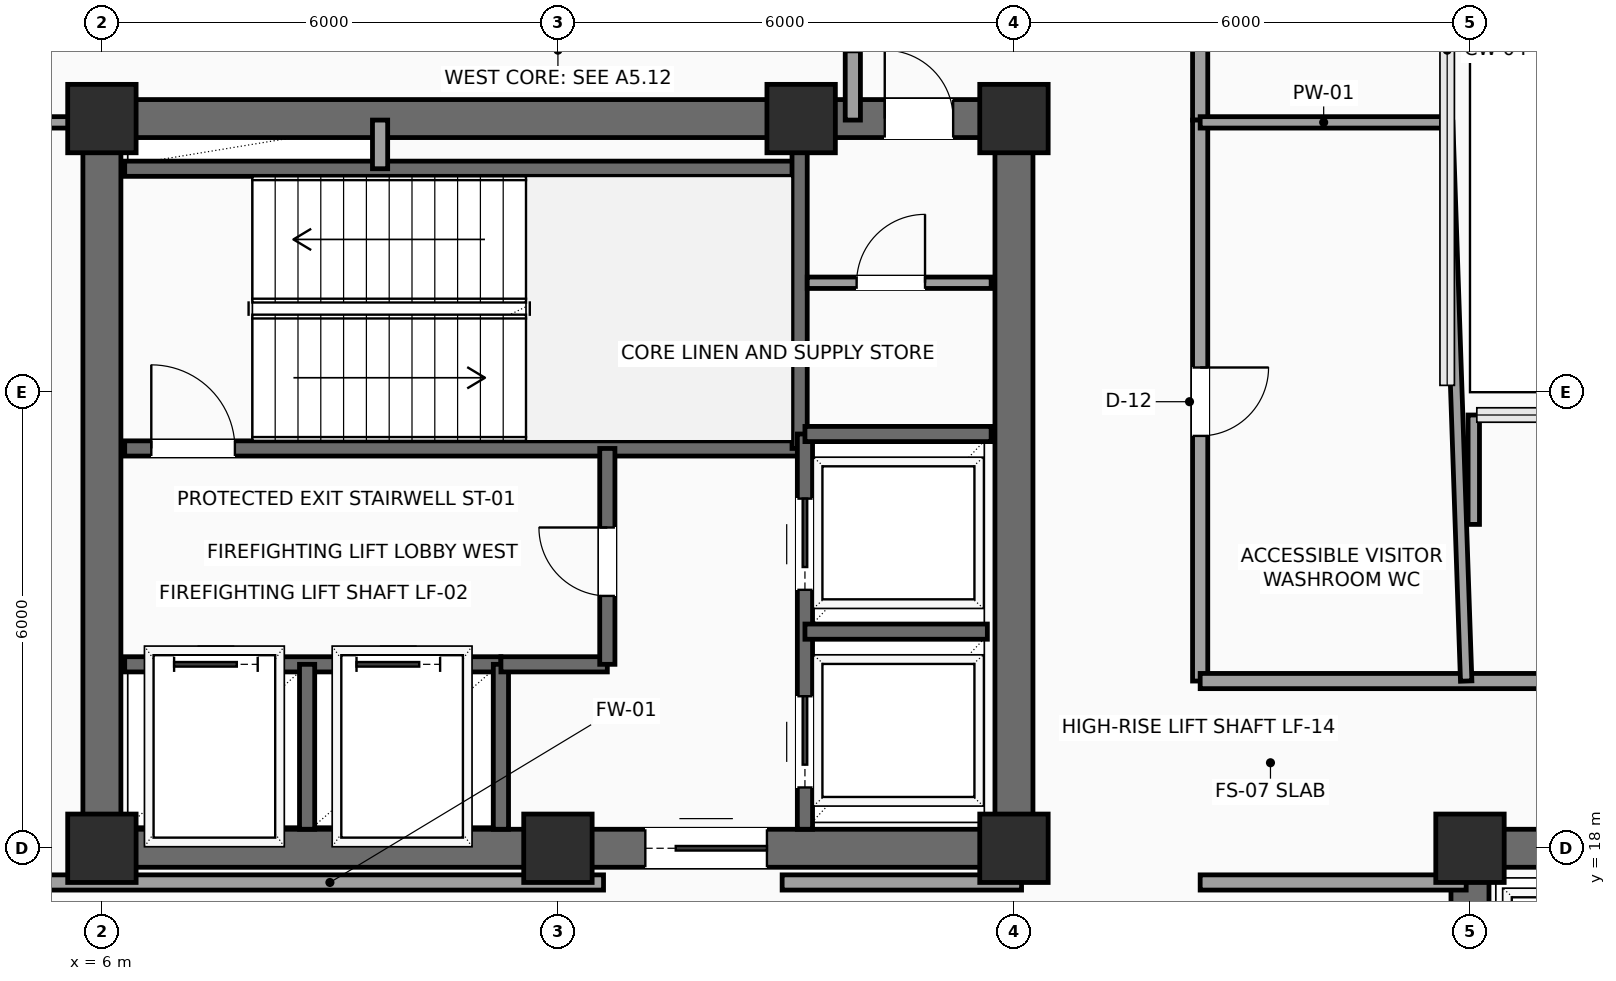
"""IFC4 building model, lengths in metres.
Left out: names, types, materials, properties, quantities, classifications, styles, units other than length and angle.
Written with IfcOpenShell. Run it as: python <this file> out.ifc"""

import sys

from ifc_helpers import new_model, si_unit, direction, frame, frame_2d, origin, origin_2d, place, context, subcontext, project, spatial, rectangle, extrude, element, fill, save


model = new_model("IFC4")
c1 = context("Model", 3, precision=1e-05, world=origin(), true_north=direction((0.0, 1.0)))
c2 = subcontext(c1, "Body", "Model", "MODEL_VIEW")
j1 = project(units=[si_unit("LENGTHUNIT", "METRE"), si_unit("PLANEANGLEUNIT", "RADIAN")], contexts=[c1])
p1 = place(None, origin())
s1 = spatial("IfcSite", under=j1, at=p1, CompositionType="ELEMENT")
p2 = place(p1, origin())
s2 = spatial("IfcBuilding", under=s1, at=p2, CompositionType="ELEMENT")
p3 = place(p2, frame((0.0, 0.0, 219.9)))
s3 = spatial("IfcBuildingStorey", under=s2, at=p3, CompositionType="ELEMENT", Elevation=219.9)
for number, where, z_axis, x_axis in (
    (1, (6.0, 18.0, 0.0), (0.0, 0.0, 1.0), (1.0, 0.0, 0.0)),
    (2, (12.0, 18.0, 0.0), (0.0, 0.0, 1.0), (1.0, 0.0, 0.0)),
    (3, (18.0, 18.0, 0.0), (0.0, 0.0, 1.0), (1.0, 0.0, 0.0)),
    (4, (6.0, 27.6, 0.0), (0.0, 0.0, 1.0), (1.0, 0.0, 0.0)),
    (5, (15.2, 27.6, 0.0), (0.0, 0.0, 1.0), (1.0, 0.0, 0.0)),
    (6, (18.0, 27.6, 0.0), (0.0, 0.0, 1.0), (1.0, 0.0, 0.0)),
    (7, (24.0, 18.0, 0.0), (0.0, 0.0, 1.0), (1.0, 0.0, 0.0)),
):
    element("IfcColumn", number, at=place(p3, frame(where, z_axis=z_axis, x_axis=x_axis)), inside=s3, PredefinedType="COLUMN", context=c2, shape_type="SweptSolid", body=[
        extrude(rectangle(XDim=0.9, YDim=0.9, at=origin_2d()), origin(), (0.0, 0.0, 1.0), 3.75),
    ])
p4 = place(p3, frame((6.0, 18.0, 0.0), z_axis=(0.0, 0.0, 1.0), x_axis=(1.0, 0.0, 0.0)))
e8 = element("IfcWall", 8, at=p4, inside=s3, PredefinedType="SHEAR", context=c2, shape_type="SweptSolid", body=[
    extrude(rectangle(XDim=12.0, YDim=0.5, at=frame_2d((6.0, 0.0))), origin(), (0.0, 0.0, 1.0), 3.54),
])
p5 = place(p4, frame((7.15, 0.0, 0.0)))
e9 = element("IfcOpeningElement", 9, at=p5, cuts=e8, PredefinedType="OPENING", context=c2, shape_type="SweptSolid", body=[
    extrude(rectangle(XDim=1.6, YDim=2.3, at=frame_2d((0.8, 1.15))), frame((0.0, 0.26, 0.0), z_axis=(0.0, -1.0, 0.0), x_axis=(1.0, 0.0, 0.0)), (0.0, 0.0, 1.0), 0.52),
])
p6 = place(p3, frame((6.0, 27.6, 0.0), z_axis=(0.0, 0.0, 1.0), x_axis=(1.0, 0.0, 0.0)))
e10 = element("IfcWall", 10, at=p6, inside=s3, PredefinedType="SHEAR", context=c2, shape_type="SweptSolid", body=[
    extrude(rectangle(XDim=12.0, YDim=0.5, at=frame_2d((6.0, 0.0))), origin(), (0.0, 0.0, 1.0), 3.54),
])
p7 = place(p6, frame((10.3, 0.0, 0.0)))
e11 = element("IfcOpeningElement", 11, at=p7, cuts=e10, PredefinedType="OPENING", context=c2, shape_type="SweptSolid", body=[
    extrude(rectangle(XDim=0.9, YDim=2.15, at=frame_2d((0.45, 1.075))), frame((0.0, 0.26, 0.0), z_axis=(0.0, -1.0, 0.0), x_axis=(1.0, 0.0, 0.0)), (0.0, 0.0, 1.0), 0.52),
])
for number, where, z_axis, x_axis in (
    (12, (6.0, 18.0, 0.0), (0.0, 0.0, 1.0), (0.0, 1.0, 0.0)),
    (13, (18.0, 18.0, 0.0), (0.0, 0.0, 1.0), (0.0, 1.0, 0.0)),
    (14, (24.0, 18.0, 0.0), (0.0, 0.0, 1.0), (1.0, 0.0, 0.0)),
):
    element("IfcWall", number, at=place(p3, frame(where, z_axis=z_axis, x_axis=x_axis)), inside=s3, PredefinedType="SHEAR", context=c2, shape_type="SweptSolid", body=[
        extrude(rectangle(XDim=9.6, YDim=0.5, at=frame_2d((4.8, 0.0))), origin(), (0.0, 0.0, 1.0), 3.54),
    ])
p8 = place(p3, frame((24.0, 6.0, 0.0), z_axis=(0.0, 0.0, 1.0), x_axis=(0.0, 1.0, 0.0)))
e15 = element("IfcWall", 15, at=p8, inside=s3, PredefinedType="SHEAR", context=c2, shape_type="SweptSolid", body=[
    extrude(rectangle(XDim=12.0, YDim=0.5, at=frame_2d((6.0, 0.0))), origin(), (0.0, 0.0, 1.0), 3.54),
])
p9 = place(p8, frame((7.15, 0.0, 0.0)))
e16 = element("IfcOpeningElement", 16, at=p9, cuts=e15, PredefinedType="OPENING", context=c2, shape_type="SweptSolid", body=[
    extrude(rectangle(XDim=1.6, YDim=2.3, at=frame_2d((0.8, 1.15))), frame((0.0, 0.26, 0.0), z_axis=(0.0, -1.0, 0.0), x_axis=(1.0, 0.0, 0.0)), (0.0, 0.0, 1.0), 0.52),
])
p10 = place(p3, frame((6.3, 23.26, 0.0), z_axis=(0.0, 0.0, 1.0), x_axis=(1.0, 0.0, 0.0)))
e17 = element("IfcWall", 17, at=p10, inside=s3, PredefinedType="SHEAR", context=c2, shape_type="SweptSolid", body=[
    extrude(rectangle(XDim=8.88, YDim=0.2, at=frame_2d((4.44, 0.0))), origin(), (0.0, 0.0, 1.0), 3.54),
])
p11 = place(p10, frame((0.35, 0.0, 0.0)))
e18 = element("IfcOpeningElement", 18, at=p11, cuts=e17, PredefinedType="OPENING", context=c2, shape_type="SweptSolid", body=[
    extrude(rectangle(XDim=1.1, YDim=2.2, at=frame_2d((0.55, 1.1))), frame((0.0, 0.11, 0.0), z_axis=(0.0, -1.0, 0.0), x_axis=(1.0, 0.0, 0.0)), (0.0, 0.0, 1.0), 0.22),
])
p12 = place(p3, frame((6.3, 26.94, 0.0), z_axis=(0.0, 0.0, 1.0), x_axis=(1.0, 0.0, 0.0)))
e19 = element("IfcWall", 19, at=p12, inside=s3, PredefinedType="SHEAR", context=c2, shape_type="SweptSolid", body=[
    extrude(rectangle(XDim=8.88, YDim=0.2, at=frame_2d((4.44, 0.0))), origin(), (0.0, 0.0, 1.0), 3.54),
])
p13 = place(p3, frame((15.18, 23.26, 0.0), z_axis=(0.0, 0.0, 1.0), x_axis=(0.0, 1.0, 0.0)))
e20 = element("IfcWall", 20, at=p13, inside=s3, PredefinedType="SHEAR", context=c2, shape_type="SweptSolid", body=[
    extrude(rectangle(XDim=4.04, YDim=0.2, at=frame_2d((2.02, 0.0))), origin(), (0.0, 0.0, 1.0), 3.54),
])
p14 = place(p3, frame((6.3, 20.42, 0.0), z_axis=(0.0, 0.0, 1.0), x_axis=(1.0, 0.0, 0.0)))
e21 = element("IfcWall", 21, at=p14, inside=s3, PredefinedType="SHEAR", context=c2, shape_type="SweptSolid", body=[
    extrude(rectangle(XDim=4.95, YDim=0.2, at=frame_2d((2.475, 0.0))), origin(), (0.0, 0.0, 1.0), 3.54),
])
p15 = place(p14, frame((0.65, 0.0, 0.0)))
e22 = element("IfcOpeningElement", 22, at=p15, cuts=e21, PredefinedType="OPENING", context=c2, shape_type="SweptSolid", body=[
    extrude(rectangle(XDim=1.1, YDim=2.2, at=frame_2d((0.55, 1.1))), frame((0.0, 0.11, 0.0), z_axis=(0.0, -1.0, 0.0), x_axis=(1.0, 0.0, 0.0)), (0.0, 0.0, 1.0), 0.22),
])
p16 = place(p14, frame((3.05, 0.0, 0.0)))
e23 = element("IfcOpeningElement", 23, at=p16, cuts=e21, PredefinedType="OPENING", context=c2, shape_type="SweptSolid", body=[
    extrude(rectangle(XDim=1.1, YDim=2.2, at=frame_2d((0.55, 1.1))), frame((0.0, 0.11, 0.0), z_axis=(0.0, -1.0, 0.0), x_axis=(1.0, 0.0, 0.0)), (0.0, 0.0, 1.0), 0.22),
])
for number, where, z_axis, x_axis in (
    (24, (8.7, 18.25, 0.0), (0.0, 0.0, 1.0), (0.0, 1.0, 0.0)),
    (25, (11.25, 18.25, 0.0), (0.0, 0.0, 1.0), (0.0, 1.0, 0.0)),
):
    element("IfcWall", number, at=place(p3, frame(where, z_axis=z_axis, x_axis=x_axis)), inside=s3, PredefinedType="SHEAR", context=c2, shape_type="SweptSolid", body=[
        extrude(rectangle(XDim=2.17, YDim=0.2, at=frame_2d((1.085, 0.0))), origin(), (0.0, 0.0, 1.0), 3.54),
    ])
p17 = place(p3, frame((11.25, 20.42, 0.0), z_axis=(0.0, 0.0, 1.0), x_axis=(1.0, 0.0, 0.0)))
e26 = element("IfcWall", 26, at=p17, inside=s3, PredefinedType="SHEAR", context=c2, shape_type="SweptSolid", body=[
    extrude(rectangle(XDim=1.4, YDim=0.2, at=frame_2d((0.7, 0.0))), origin(), (0.0, 0.0, 1.0), 3.54),
])
p18 = place(p3, frame((12.65, 20.42, 0.0), z_axis=(0.0, 0.0, 1.0), x_axis=(0.0, 1.0, 0.0)))
e27 = element("IfcWall", 27, at=p18, inside=s3, PredefinedType="SHEAR", context=c2, shape_type="SweptSolid", body=[
    extrude(rectangle(XDim=2.84, YDim=0.2, at=frame_2d((1.42, 0.0))), origin(), (0.0, 0.0, 1.0), 3.54),
])
p19 = place(p18, frame((0.9, 0.0, 0.0)))
e28 = element("IfcOpeningElement", 28, at=p19, cuts=e27, PredefinedType="OPENING", context=c2, shape_type="SweptSolid", body=[
    extrude(rectangle(XDim=0.9, YDim=2.15, at=frame_2d((0.45, 1.075))), frame((0.0, 0.11, 0.0), z_axis=(0.0, -1.0, 0.0), x_axis=(1.0, 0.0, 0.0)), (0.0, 0.0, 1.0), 0.22),
])
p20 = place(p3, frame((9.66, 26.94, 0.0), z_axis=(0.0, 0.0, 1.0), x_axis=(0.0, 1.0, 0.0)))
e29 = element("IfcWall", 29, at=p20, inside=s3, PredefinedType="SOLIDWALL", context=c2, shape_type="SweptSolid", body=[
    extrude(rectangle(XDim=0.64, YDim=0.2, at=frame_2d((0.32, 0.0))), origin(), (0.0, 0.0, 1.0), 3.54),
])
p21 = place(p3, frame((15.25, 18.25, 0.0), z_axis=(0.0, 0.0, 1.0), x_axis=(0.0, 1.0, 0.0)))
e30 = element("IfcWall", 30, at=p21, inside=s3, PredefinedType="SHEAR", context=c2, shape_type="SweptSolid", body=[
    extrude(rectangle(XDim=5.2, YDim=0.2, at=frame_2d((2.6, 0.0))), origin(), (0.0, 0.0, 1.0), 3.54),
])
p22 = place(p21, frame((0.55, 0.0, 0.0)))
e31 = element("IfcOpeningElement", 31, at=p22, cuts=e30, PredefinedType="OPENING", context=c2, shape_type="SweptSolid", body=[
    extrude(rectangle(XDim=1.2, YDim=2.2, at=frame_2d((0.6, 1.1))), frame((0.0, 0.11, 0.0), z_axis=(0.0, -1.0, 0.0), x_axis=(1.0, 0.0, 0.0)), (0.0, 0.0, 1.0), 0.22),
])
p23 = place(p21, frame((3.15, 0.0, 0.0)))
e32 = element("IfcOpeningElement", 32, at=p23, cuts=e30, PredefinedType="OPENING", context=c2, shape_type="SweptSolid", body=[
    extrude(rectangle(XDim=1.2, YDim=2.2, at=frame_2d((0.6, 1.1))), frame((0.0, 0.11, 0.0), z_axis=(0.0, -1.0, 0.0), x_axis=(1.0, 0.0, 0.0)), (0.0, 0.0, 1.0), 0.22),
])
p24 = place(p3, frame((15.25, 20.85, 0.0), z_axis=(0.0, 0.0, 1.0), x_axis=(1.0, 0.0, 0.0)))
e33 = element("IfcWall", 33, at=p24, inside=s3, PredefinedType="SHEAR", context=c2, shape_type="SweptSolid", body=[
    extrude(rectangle(XDim=2.4, YDim=0.2, at=frame_2d((1.2, 0.0))), origin(), (0.0, 0.0, 1.0), 3.54),
])
p25 = place(p3, frame((15.25, 23.45, 0.0), z_axis=(0.0, 0.0, 1.0), x_axis=(1.0, 0.0, 0.0)))
e34 = element("IfcWall", 34, at=p25, inside=s3, PredefinedType="SHEAR", context=c2, shape_type="SweptSolid", body=[
    extrude(rectangle(XDim=2.45, YDim=0.2, at=frame_2d((1.225, 0.0))), origin(), (0.0, 0.0, 1.0), 3.54),
])
p26 = place(p3, frame((15.28, 25.44, 0.0), z_axis=(0.0, 0.0, 1.0), x_axis=(1.0, 0.0, 0.0)))
e35 = element("IfcWall", 35, at=p26, inside=s3, PredefinedType="PARTITIONING", context=c2, shape_type="SweptSolid", body=[
    extrude(rectangle(XDim=2.42, YDim=0.15, at=frame_2d((1.21, 0.0))), origin(), (0.0, 0.0, 1.0), 3.54),
])
p27 = place(p26, frame((0.65, 0.0, 0.0)))
e36 = element("IfcOpeningElement", 36, at=p27, cuts=e35, PredefinedType="OPENING", context=c2, shape_type="SweptSolid", body=[
    extrude(rectangle(XDim=0.9, YDim=2.15, at=frame_2d((0.45, 1.075))), frame((0.0, 0.085, 0.0), z_axis=(0.0, -1.0, 0.0), x_axis=(1.0, 0.0, 0.0)), (0.0, 0.0, 1.0), 0.17),
])
p28 = place(p3, frame((0.3, 17.55, 0.0), z_axis=(0.0, 0.0, 1.0), x_axis=(1.0, 0.0, 0.0)))
e37 = element("IfcWall", 37, at=p28, inside=s3, PredefinedType="SOLIDWALL", context=c2, shape_type="SweptSolid", body=[
    extrude(rectangle(XDim=12.3, YDim=0.2, at=frame_2d((6.15, 0.0))), origin(), (0.0, 0.0, 1.0), 3.54),
])
p29 = place(p28, frame((1.18, 0.0, 0.0)))
e38 = element("IfcOpeningElement", 38, at=p29, cuts=e37, PredefinedType="OPENING", context=c2, shape_type="SweptSolid", body=[
    extrude(rectangle(XDim=0.95, YDim=2.15, at=frame_2d((0.475, 1.075))), frame((0.0, 0.11, 0.0), z_axis=(0.0, -1.0, 0.0), x_axis=(1.0, 0.0, 0.0)), (0.0, 0.0, 1.0), 0.22),
])
p30 = place(p28, frame((3.775, 0.0, 0.0)))
e39 = element("IfcOpeningElement", 39, at=p30, cuts=e37, PredefinedType="OPENING", context=c2, shape_type="SweptSolid", body=[
    extrude(rectangle(XDim=0.95, YDim=2.15, at=frame_2d((0.475, 1.075))), frame((0.0, 0.11, 0.0), z_axis=(0.0, -1.0, 0.0), x_axis=(1.0, 0.0, 0.0)), (0.0, 0.0, 1.0), 0.22),
])
p31 = place(p3, frame((14.95, 17.55, 0.0), z_axis=(0.0, 0.0, 1.0), x_axis=(1.0, 0.0, 0.0)))
e40 = element("IfcWall", 40, at=p31, inside=s3, PredefinedType="SOLIDWALL", context=c2, shape_type="SweptSolid", body=[
    extrude(rectangle(XDim=3.15, YDim=0.2, at=frame_2d((1.575, 0.0))), origin(), (0.0, 0.0, 1.0), 3.54),
])
p32 = place(p3, frame((15.88, 27.58, 0.0), z_axis=(0.0, 0.0, 1.0), x_axis=(0.0, 1.0, 0.0)))
e41 = element("IfcWall", 41, at=p32, inside=s3, PredefinedType="SOLIDWALL", context=c2, shape_type="SweptSolid", body=[
    extrude(rectangle(XDim=2.67, YDim=0.2, at=frame_2d((1.335, 0.0))), origin(), (0.0, 0.0, 1.0), 3.54),
])
p33 = place(p32, frame((0.895, 0.0, 0.0)))
e42 = element("IfcOpeningElement", 42, at=p33, cuts=e41, PredefinedType="OPENING", context=c2, shape_type="SweptSolid", body=[
    extrude(rectangle(XDim=0.95, YDim=2.15, at=frame_2d((0.475, 1.075))), frame((0.0, 0.11, 0.0), z_axis=(0.0, -1.0, 0.0), x_axis=(1.0, 0.0, 0.0)), (0.0, 0.0, 1.0), 0.22),
])
p34 = place(p3, frame((20.45, 30.25, 0.0), z_axis=(0.0, 0.0, 1.0), x_axis=(0.0, -1.0, 0.0)))
e43 = element("IfcWall", 43, at=p34, inside=s3, PredefinedType="SOLIDWALL", context=c2, shape_type="SweptSolid", body=[
    extrude(rectangle(XDim=2.67, YDim=0.2, at=frame_2d((1.335, 0.0))), origin(), (0.0, 0.0, 1.0), 3.54),
])
p35 = place(p3, frame((20.45, 27.58, 0.0), z_axis=(0.0, 0.0, 1.0), x_axis=(0.0, -1.0, 0.0)))
e44 = element("IfcWall", 44, at=p35, inside=s3, PredefinedType="SOLIDWALL", context=c2, shape_type="SweptSolid", body=[
    extrude(rectangle(XDim=7.38, YDim=0.2, at=frame_2d((3.69, 0.0))), origin(), (0.0, 0.0, 1.0), 3.54),
])
p36 = place(p35, frame((3.255, 0.0, 0.0)))
e45 = element("IfcOpeningElement", 45, at=p36, cuts=e44, PredefinedType="OPENING", context=c2, shape_type="SweptSolid", body=[
    extrude(rectangle(XDim=0.9, YDim=2.1, at=frame_2d((0.45, 1.05))), frame((0.0, 0.11, 0.0), z_axis=(0.0, -1.0, 0.0), x_axis=(1.0, 0.0, 0.0)), (0.0, 0.0, 1.0), 0.22),
])
p37 = place(p3, frame((20.45, 20.2, 0.0), z_axis=(0.0, 0.0, 1.0), x_axis=(1.0, 0.0, 0.0)))
e46 = element("IfcWall", 46, at=p37, inside=s3, PredefinedType="SOLIDWALL", context=c2, shape_type="SweptSolid", body=[
    extrude(rectangle(XDim=15.7, YDim=0.2, at=frame_2d((7.85, 0.0))), origin(), (0.0, 0.0, 1.0), 3.54),
])
p38 = place(p37, frame((7.875, 0.0, 0.0)))
e47 = element("IfcOpeningElement", 47, at=p38, cuts=e46, PredefinedType="OPENING", context=c2, shape_type="SweptSolid", body=[
    extrude(rectangle(XDim=0.95, YDim=2.15, at=frame_2d((0.475, 1.075))), frame((0.0, 0.11, 0.0), z_axis=(0.0, -1.0, 0.0), x_axis=(1.0, 0.0, 0.0)), (0.0, 0.0, 1.0), 0.22),
])
p39 = place(p3, frame((20.45, 17.55, 0.0), z_axis=(0.0, 0.0, 1.0), x_axis=(1.0, 0.0, 0.0)))
e48 = element("IfcWall", 48, at=p39, inside=s3, PredefinedType="SOLIDWALL", context=c2, shape_type="SweptSolid", body=[
    extrude(rectangle(XDim=3.5, YDim=0.2, at=frame_2d((1.75, 0.0))), origin(), (0.0, 0.0, 1.0), 3.54),
])
p40 = place(p3, frame((20.45, 27.55, 0.0), z_axis=(0.0, 0.0, 1.0), x_axis=(1.0, 0.0, 0.0)))
e49 = element("IfcWall", 49, at=p40, inside=s3, PredefinedType="PARTITIONING", context=c2, shape_type="SweptSolid", body=[
    extrude(rectangle(XDim=3.25, YDim=0.15, at=frame_2d((1.625, 0.0))), origin(), (0.0, 0.0, 1.0), 3.54),
])
p41 = place(p3, frame((23.95, 20.2, 0.0), z_axis=(0.0, 0.0, 1.0), x_axis=(-0.033993495762, 0.999422054112, 0.0)))
e50 = element("IfcWall", 50, at=p41, inside=s3, PredefinedType="PARTITIONING", context=c2, shape_type="SweptSolid", body=[
    extrude(rectangle(XDim=7.354, YDim=0.15, at=frame_2d((3.677, 0.0))), origin(), (0.0, 0.0, 1.0), 3.54),
])
p42 = place(p3, frame((24.05, 22.261, 0.0), z_axis=(0.0, 0.0, 1.0), x_axis=(0.0, 1.0, 0.0)))
e51 = element("IfcWall", 51, at=p42, inside=s3, PredefinedType="PARTITIONING", context=c2, shape_type="SweptSolid", body=[
    extrude(rectangle(XDim=1.439, YDim=0.15, at=frame_2d((0.719, 0.0))), origin(), (0.0, 0.0, 1.0), 3.54),
])
p43 = place(p3, frame((3.15, 27.55, 0.0), z_axis=(0.0, 0.0, 1.0), x_axis=(1.0, 0.0, 0.0)))
e52 = element("IfcWall", 52, at=p43, inside=s3, PredefinedType="PARTITIONING", context=c2, shape_type="SweptSolid", body=[
    extrude(rectangle(XDim=2.8, YDim=0.15, at=frame_2d((1.4, 0.0))), origin(), (0.0, 0.0, 1.0), 3.54),
])
p44 = place(p5, origin())
e53 = element("IfcDoor", 53, at=p44, inside=s3, OperationType="DOUBLE_DOOR_SLIDING", PredefinedType="DOOR", context=c2, shape_type="SweptSolid", body=[
    extrude(rectangle(XDim=1.6, YDim=2.3, at=frame_2d((0.8, 1.15))), frame((0.0, 0.025, 0.0), z_axis=(0.0, -1.0, 0.0), x_axis=(1.0, 0.0, 0.0)), (0.0, 0.0, 1.0), 0.05),
])
fill(e9, e53)
p45 = place(p7, origin())
e54 = element("IfcDoor", 54, at=p45, inside=s3, OperationType="SINGLE_SWING_LEFT", PredefinedType="DOOR", context=c2, shape_type="SweptSolid", body=[
    extrude(rectangle(XDim=0.9, YDim=2.15, at=frame_2d((0.45, 1.075))), frame((0.0, 0.025, 0.0), z_axis=(0.0, -1.0, 0.0), x_axis=(1.0, 0.0, 0.0)), (0.0, 0.0, 1.0), 0.05),
])
fill(e11, e54)
p46 = place(p11, origin())
e55 = element("IfcDoor", 55, at=p46, inside=s3, OperationType="SINGLE_SWING_LEFT", PredefinedType="DOOR", context=c2, shape_type="SweptSolid", body=[
    extrude(rectangle(XDim=1.1, YDim=2.2, at=frame_2d((0.55, 1.1))), frame((0.0, 0.025, 0.0), z_axis=(0.0, -1.0, 0.0), x_axis=(1.0, 0.0, 0.0)), (0.0, 0.0, 1.0), 0.05),
])
fill(e18, e55)
p47 = place(p15, origin())
e56 = element("IfcDoor", 56, at=p47, inside=s3, OperationType="SLIDING_TO_LEFT", PredefinedType="DOOR", context=c2, shape_type="SweptSolid", body=[
    extrude(rectangle(XDim=1.1, YDim=2.2, at=frame_2d((0.55, 1.1))), frame((0.0, 0.025, 0.0), z_axis=(0.0, -1.0, 0.0), x_axis=(1.0, 0.0, 0.0)), (0.0, 0.0, 1.0), 0.05),
])
fill(e22, e56)
p48 = place(p16, origin())
e57 = element("IfcDoor", 57, at=p48, inside=s3, OperationType="SLIDING_TO_LEFT", PredefinedType="DOOR", context=c2, shape_type="SweptSolid", body=[
    extrude(rectangle(XDim=1.1, YDim=2.2, at=frame_2d((0.55, 1.1))), frame((0.0, 0.025, 0.0), z_axis=(0.0, -1.0, 0.0), x_axis=(1.0, 0.0, 0.0)), (0.0, 0.0, 1.0), 0.05),
])
fill(e23, e57)
p49 = place(p19, origin())
e58 = element("IfcDoor", 58, at=p49, inside=s3, OperationType="SINGLE_SWING_RIGHT", PredefinedType="DOOR", context=c2, shape_type="SweptSolid", body=[
    extrude(rectangle(XDim=0.9, YDim=2.15, at=frame_2d((0.45, 1.075))), frame((0.0, 0.025, 0.0), z_axis=(0.0, -1.0, 0.0), x_axis=(1.0, 0.0, 0.0)), (0.0, 0.0, 1.0), 0.05),
])
fill(e28, e58)
p50 = place(p22, origin())
e59 = element("IfcDoor", 59, at=p50, inside=s3, OperationType="SLIDING_TO_RIGHT", PredefinedType="DOOR", context=c2, shape_type="SweptSolid", body=[
    extrude(rectangle(XDim=1.2, YDim=2.2, at=frame_2d((0.6, 1.1))), frame((0.0, 0.025, 0.0), z_axis=(0.0, -1.0, 0.0), x_axis=(1.0, 0.0, 0.0)), (0.0, 0.0, 1.0), 0.05),
])
fill(e31, e59)
p51 = place(p23, origin())
e60 = element("IfcDoor", 60, at=p51, inside=s3, OperationType="SLIDING_TO_RIGHT", PredefinedType="DOOR", context=c2, shape_type="SweptSolid", body=[
    extrude(rectangle(XDim=1.2, YDim=2.2, at=frame_2d((0.6, 1.1))), frame((0.0, 0.025, 0.0), z_axis=(0.0, -1.0, 0.0), x_axis=(1.0, 0.0, 0.0)), (0.0, 0.0, 1.0), 0.05),
])
fill(e32, e60)
p52 = place(p27, origin())
e61 = element("IfcDoor", 61, at=p52, inside=s3, OperationType="SINGLE_SWING_RIGHT", PredefinedType="DOOR", context=c2, shape_type="SweptSolid", body=[
    extrude(rectangle(XDim=0.9, YDim=2.15, at=frame_2d((0.45, 1.075))), frame((0.0, 0.025, 0.0), z_axis=(0.0, -1.0, 0.0), x_axis=(1.0, 0.0, 0.0)), (0.0, 0.0, 1.0), 0.05),
])
fill(e36, e61)
p53 = place(p36, origin())
e62 = element("IfcDoor", 62, at=p53, inside=s3, OperationType="SINGLE_SWING_LEFT", PredefinedType="DOOR", context=c2, shape_type="SweptSolid", body=[
    extrude(rectangle(XDim=0.9, YDim=2.1, at=frame_2d((0.45, 1.05))), frame((0.0, 0.025, 0.0), z_axis=(0.0, -1.0, 0.0), x_axis=(1.0, 0.0, 0.0)), (0.0, 0.0, 1.0), 0.05),
])
fill(e45, e62)
save(model, sys.argv[1])
